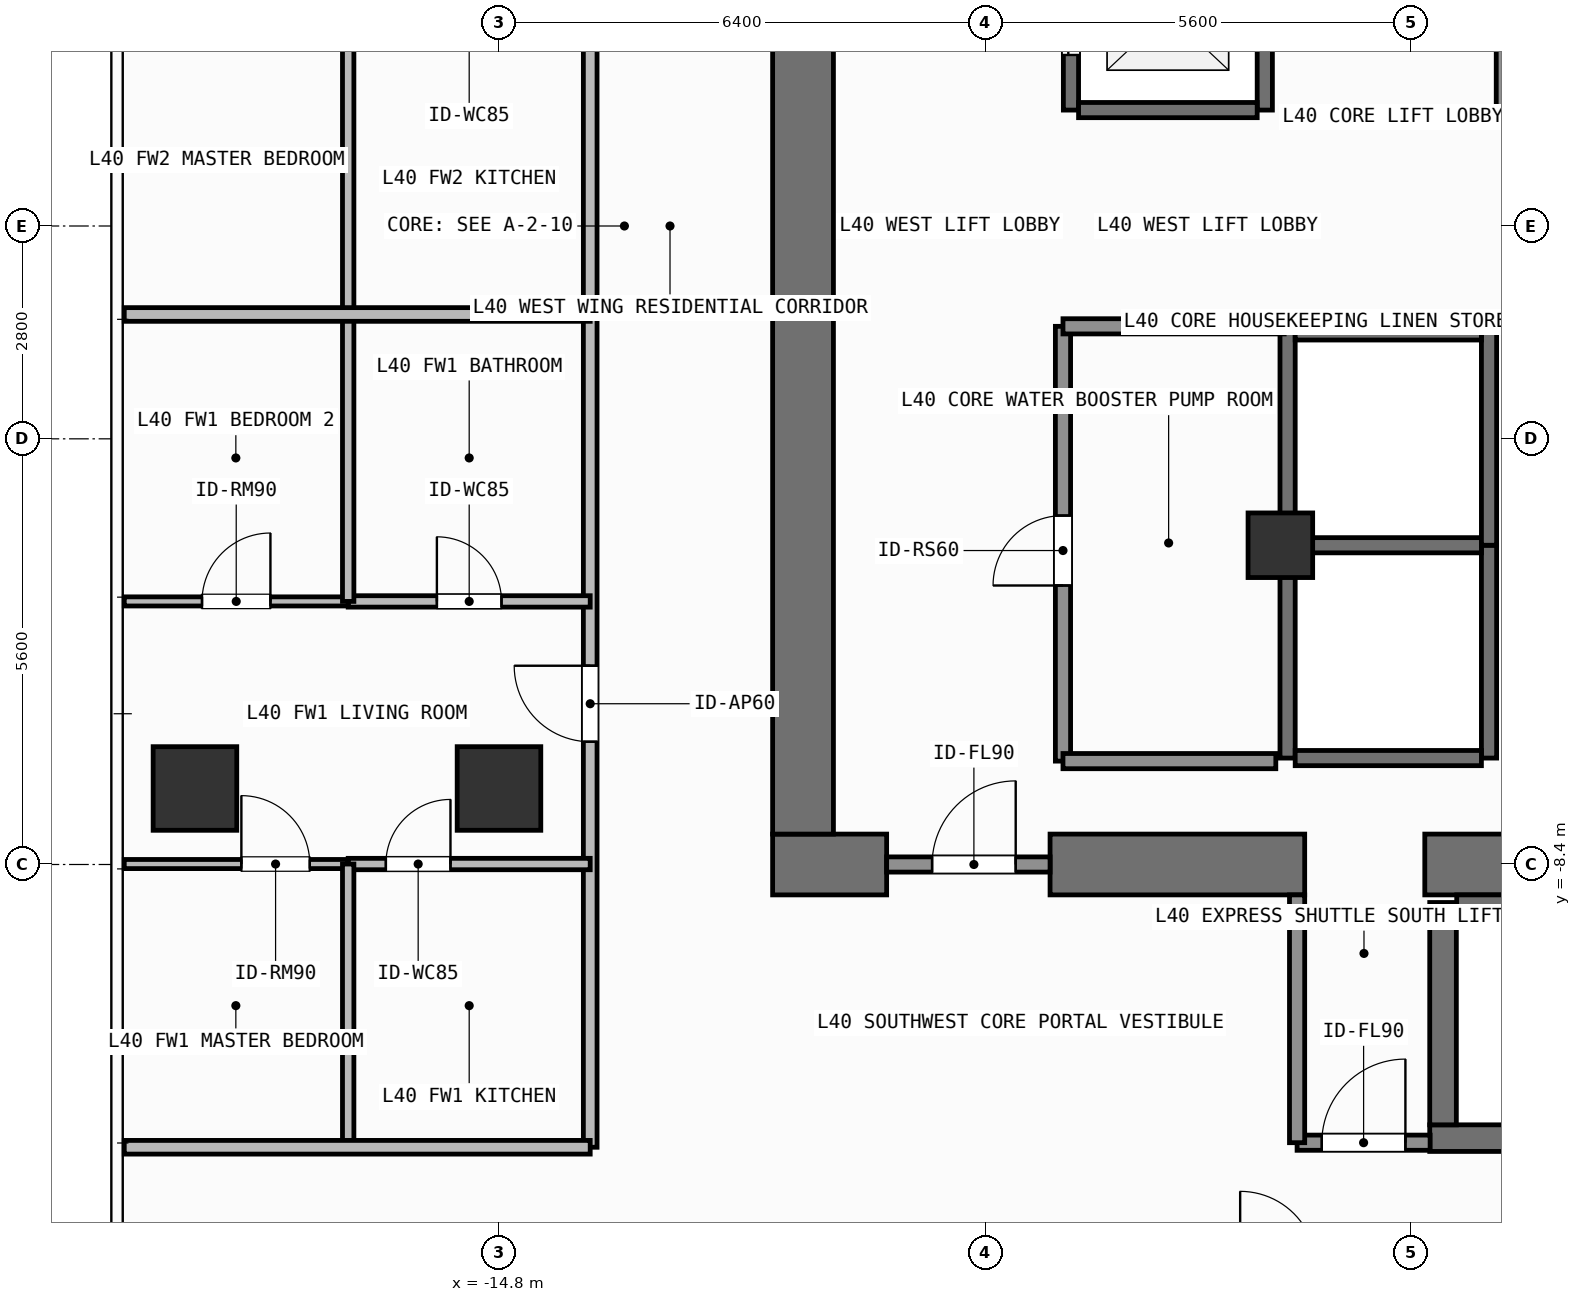
"""IFC4 building model, lengths in metres.
Left out: names, types, materials, properties, quantities, classifications, styles, units other than length and angle.
Written with IfcOpenShell. Run it as: python <this file> out.ifc"""

import sys

from ifc_helpers import new_model, si_unit, direction, frame, frame_2d, origin, origin_2d, place, context, subcontext, project, spatial, rectangle, extrude, element, fill, save


model = new_model("IFC4")
c1 = context("Model", 3, precision=1e-05, world=origin(), true_north=direction((0.0, 1.0)))
c2 = subcontext(c1, "Body", "Model", "MODEL_VIEW")
j1 = project(units=[si_unit("LENGTHUNIT", "METRE"), si_unit("PLANEANGLEUNIT", "RADIAN")], contexts=[c1])
p1 = place(None, origin())
s1 = spatial("IfcSite", under=j1, at=p1, CompositionType="ELEMENT")
p2 = place(p1, origin())
s2 = spatial("IfcBuilding", under=s1, at=p2, CompositionType="ELEMENT")
p3 = place(p2, frame((0.0, 0.0, 164.1)))
s3 = spatial("IfcBuildingStorey", under=s2, at=p3, CompositionType="ELEMENT", Elevation=164.1)
p4 = place(p3, frame((-11.2, -8.4, 0.0), z_axis=(0.0, 0.0, 1.0), x_axis=(1.0, 0.0, 0.0)))
e1 = element("IfcWall", 1, at=p4, inside=s3, PredefinedType="SHEAR", context=c2, shape_type="SweptSolid", body=[
    extrude(rectangle(XDim=1.5, YDim=0.8, at=frame_2d((0.75, 0.0))), origin(), (0.0, 0.0, 1.0), 3.9),
])
p5 = place(p3, frame((-7.55, -8.4, 0.0), z_axis=(0.0, 0.0, 1.0), x_axis=(1.0, 0.0, 0.0)))
e2 = element("IfcWall", 2, at=p5, inside=s3, PredefinedType="SHEAR", context=c2, shape_type="SweptSolid", body=[
    extrude(rectangle(XDim=3.35, YDim=0.8, at=frame_2d((1.675, 0.0))), origin(), (0.0, 0.0, 1.0), 3.9),
])
p6 = place(p3, frame((-2.62, -8.4, 0.0), z_axis=(0.0, 0.0, 1.0), x_axis=(1.0, 0.0, 0.0)))
e3 = element("IfcWall", 3, at=p6, inside=s3, PredefinedType="SHEAR", context=c2, shape_type="SweptSolid", body=[
    extrude(rectangle(XDim=7.27, YDim=0.8, at=frame_2d((3.635, 0.0))), origin(), (0.0, 0.0, 1.0), 3.9),
])
p7 = place(p3, frame((-10.8, -8.0, 0.0), z_axis=(0.0, 0.0, 1.0), x_axis=(0.0, 1.0, 0.0)))
e4 = element("IfcWall", 4, at=p7, inside=s3, PredefinedType="SHEAR", context=c2, shape_type="SweptSolid", body=[
    extrude(rectangle(XDim=16.0, YDim=0.8, at=frame_2d((8.0, 0.0))), origin(), (0.0, 0.0, 1.0), 3.9),
])
p8 = place(p3, frame((-2.555, -12.0, 0.0), z_axis=(0.0, 0.0, 1.0), x_axis=(1.0, 0.0, 0.0)))
e5 = element("IfcWall", 5, at=p8, inside=s3, PredefinedType="SHEAR", context=c2, shape_type="SweptSolid", body=[
    extrude(rectangle(XDim=7.31, YDim=0.35, at=frame_2d((3.655, 0.0))), origin(), (0.0, 0.0, 1.0), 3.9),
])
p9 = place(p3, frame((-2.2, -8.913, 0.0), z_axis=(0.0, 0.0, 1.0), x_axis=(1.0, 0.0, 0.0)))
e6 = element("IfcWall", 6, at=p9, inside=s3, PredefinedType="SHEAR", context=c2, shape_type="SweptSolid", body=[
    extrude(rectangle(XDim=6.6, YDim=0.225, at=frame_2d((3.3, 0.0))), origin(), (0.0, 0.0, 1.0), 3.9),
])
p10 = place(p3, frame((-2.38, -11.825, 0.0), z_axis=(0.0, 0.0, 1.0), x_axis=(0.0, 1.0, 0.0)))
e7 = element("IfcWall", 7, at=p10, inside=s3, PredefinedType="SHEAR", context=c2, shape_type="SweptSolid", body=[
    extrude(rectangle(XDim=2.925, YDim=0.35, at=frame_2d((1.462, 0.0))), origin(), (0.0, 0.0, 1.0), 3.9),
])
p11 = place(p3, frame((-14.8, -7.4, 0.0), z_axis=(0.0, 0.0, 1.0), x_axis=(1.0, 0.0, 0.0)))
e8 = element("IfcColumn", 8, at=p11, inside=s3, PredefinedType="COLUMN", context=c2, shape_type="SweptSolid", body=[
    extrude(rectangle(XDim=1.1, YDim=1.1, at=origin_2d()), origin(), (0.0, 0.0, 1.0), 3.9),
])
p12 = place(p3, frame((-4.52, -4.2, 0.0), z_axis=(0.0, 0.0, 1.0), x_axis=(1.0, 0.0, 0.0)))
e9 = element("IfcColumn", 9, at=p12, inside=s3, PredefinedType="COLUMN", context=c2, shape_type="SweptSolid", body=[
    extrude(rectangle(XDim=0.85, YDim=0.85, at=origin_2d()), origin(), (0.0, 0.0, 1.0), 3.9),
])
p13 = place(p3, frame((-18.8, -7.4, 0.0), z_axis=(0.0, 0.0, 1.0), x_axis=(1.0, 0.0, 0.0)))
e10 = element("IfcColumn", 10, at=p13, inside=s3, PredefinedType="COLUMN", context=c2, shape_type="SweptSolid", body=[
    extrude(rectangle(XDim=1.1, YDim=1.1, at=origin_2d()), origin(), (0.0, 0.0, 1.0), 3.9),
])
p14 = place(p3, frame((-7.275, 1.525, 0.0), z_axis=(0.0, 0.0, 1.0), x_axis=(0.0, 1.0, 0.0)))
e11 = element("IfcWall", 11, at=p14, inside=s3, PredefinedType="SHEAR", context=c2, shape_type="SweptSolid", body=[
    extrude(rectangle(XDim=2.55, YDim=0.2, at=frame_2d((1.275, 0.0))), origin(), (0.0, 0.0, 1.0), 3.62),
])
p15 = place(p14, frame((0.725, 0.0, 0.0)))
e12 = element("IfcOpeningElement", 12, at=p15, cuts=e11, PredefinedType="OPENING", context=c2, shape_type="SweptSolid", body=[
    extrude(rectangle(XDim=1.1, YDim=2.2, at=frame_2d((0.55, 1.1))), frame((0.0, 0.11, 0.0), z_axis=(0.0, -1.0, 0.0), x_axis=(1.0, 0.0, 0.0)), (0.0, 0.0, 1.0), 0.22),
])
p16 = place(p3, frame((-4.725, 1.525, 0.0), z_axis=(0.0, 0.0, 1.0), x_axis=(0.0, 1.0, 0.0)))
e13 = element("IfcWall", 13, at=p16, inside=s3, PredefinedType="SHEAR", context=c2, shape_type="SweptSolid", body=[
    extrude(rectangle(XDim=2.55, YDim=0.2, at=frame_2d((1.275, 0.0))), origin(), (0.0, 0.0, 1.0), 3.62),
])
p17 = place(p3, frame((-7.175, 1.525, 0.0), z_axis=(0.0, 0.0, 1.0), x_axis=(1.0, 0.0, 0.0)))
e14 = element("IfcWall", 14, at=p17, inside=s3, PredefinedType="SHEAR", context=c2, shape_type="SweptSolid", body=[
    extrude(rectangle(XDim=2.35, YDim=0.2, at=frame_2d((1.175, 0.0))), origin(), (0.0, 0.0, 1.0), 3.62),
])
for number, where, z_axis, x_axis in (
    (15, (-4.425, -7.0, 0.0), (0.0, 0.0, 1.0), (0.0, 1.0, 0.0)),
    (16, (-1.775, -7.0, 0.0), (0.0, 0.0, 1.0), (0.0, 1.0, 0.0)),
):
    element("IfcWall", number, at=place(p3, frame(where, z_axis=z_axis, x_axis=x_axis)), inside=s3, PredefinedType="SHEAR", context=c2, shape_type="SweptSolid", body=[
        extrude(rectangle(XDim=2.8, YDim=0.2, at=frame_2d((1.4, 0.0))), origin(), (0.0, 0.0, 1.0), 3.62),
    ])
for number, where, z_axis, x_axis in (
    (17, (-4.325, -7.0, 0.0), (0.0, 0.0, 1.0), (1.0, 0.0, 0.0)),
    (18, (-4.325, -4.2, 0.0), (0.0, 0.0, 1.0), (1.0, 0.0, 0.0)),
):
    element("IfcWall", number, at=place(p3, frame(where, z_axis=z_axis, x_axis=x_axis)), inside=s3, PredefinedType="SHEAR", context=c2, shape_type="SweptSolid", body=[
        extrude(rectangle(XDim=2.45, YDim=0.2, at=frame_2d((1.225, 0.0))), origin(), (0.0, 0.0, 1.0), 3.62),
    ])
for number, where, z_axis, x_axis in (
    (19, (-4.425, -4.2, 0.0), (0.0, 0.0, 1.0), (0.0, 1.0, 0.0)),
    (20, (-1.775, -4.2, 0.0), (0.0, 0.0, 1.0), (0.0, 1.0, 0.0)),
):
    element("IfcWall", number, at=place(p3, frame(where, z_axis=z_axis, x_axis=x_axis)), inside=s3, PredefinedType="SHEAR", context=c2, shape_type="SweptSolid", body=[
        extrude(rectangle(XDim=2.8, YDim=0.2, at=frame_2d((1.4, 0.0))), origin(), (0.0, 0.0, 1.0), 3.62),
    ])
p18 = place(p3, frame((-4.325, -1.4, 0.0), z_axis=(0.0, 0.0, 1.0), x_axis=(1.0, 0.0, 0.0)))
e21 = element("IfcWall", 21, at=p18, inside=s3, PredefinedType="SHEAR", context=c2, shape_type="SweptSolid", body=[
    extrude(rectangle(XDim=2.45, YDim=0.2, at=frame_2d((1.225, 0.0))), origin(), (0.0, 0.0, 1.0), 3.62),
])
p19 = place(p3, frame((-9.7, -8.4, 0.0), z_axis=(0.0, 0.0, 1.0), x_axis=(1.0, 0.0, 0.0)))
e22 = element("IfcWall", 22, at=p19, inside=s3, PredefinedType="SOLIDWALL", context=c2, shape_type="SweptSolid", body=[
    extrude(rectangle(XDim=2.15, YDim=0.2, at=frame_2d((1.075, 0.0))), origin(), (0.0, 0.0, 1.0), 2.76),
])
p20 = place(p19, frame((0.598, 0.0, 0.0)))
e23 = element("IfcOpeningElement", 23, at=p20, cuts=e22, PredefinedType="OPENING", context=c2, shape_type="SweptSolid", body=[
    extrude(rectangle(XDim=1.1, YDim=2.15, at=frame_2d((0.55, 1.075))), frame((0.0, 0.11, 0.0), z_axis=(0.0, -1.0, 0.0), x_axis=(1.0, 0.0, 0.0)), (0.0, 0.0, 1.0), 0.22),
])
p21 = place(p3, frame((-4.3, -12.06, 0.0), z_axis=(0.0, 0.0, 1.0), x_axis=(1.0, 0.0, 0.0)))
e24 = element("IfcWall", 24, at=p21, inside=s3, PredefinedType="SOLIDWALL", context=c2, shape_type="SweptSolid", body=[
    extrude(rectangle(XDim=1.75, YDim=0.2, at=frame_2d((0.875, 0.0))), origin(), (0.0, 0.0, 1.0), 3.62),
])
p22 = place(p21, frame((0.325, 0.0, 0.0)))
e25 = element("IfcOpeningElement", 25, at=p22, cuts=e24, PredefinedType="OPENING", context=c2, shape_type="SweptSolid", body=[
    extrude(rectangle(XDim=1.1, YDim=2.15, at=frame_2d((0.55, 1.075))), frame((0.0, 0.11, 0.0), z_axis=(0.0, -1.0, 0.0), x_axis=(1.0, 0.0, 0.0)), (0.0, 0.0, 1.0), 0.22),
])
p23 = place(p3, frame((-7.38, -7.04, 0.0), z_axis=(0.0, 0.0, 1.0), x_axis=(0.0, 1.0, 0.0)))
e26 = element("IfcWall", 26, at=p23, inside=s3, PredefinedType="SOLIDWALL", context=c2, shape_type="SweptSolid", body=[
    extrude(rectangle(XDim=5.72, YDim=0.2, at=frame_2d((2.86, 0.0))), origin(), (0.0, 0.0, 1.0), 3.62),
])
p24 = place(p23, frame((2.31, 0.0, 0.0)))
e27 = element("IfcOpeningElement", 27, at=p24, cuts=e26, PredefinedType="OPENING", context=c2, shape_type="SweptSolid", body=[
    extrude(rectangle(XDim=0.92, YDim=2.1, at=frame_2d((0.46, 1.05))), frame((0.0, 0.11, 0.0), z_axis=(0.0, -1.0, 0.0), x_axis=(1.0, 0.0, 0.0)), (0.0, 0.0, 1.0), 0.22),
])
p25 = place(p3, frame((-13.6, -12.12, 0.0), z_axis=(0.0, 0.0, 1.0), x_axis=(0.0, 1.0, 0.0)))
e28 = element("IfcWall", 28, at=p25, inside=s3, PredefinedType="PARTITIONING", context=c2, shape_type="SweptSolid", body=[
    extrude(rectangle(XDim=10.956, YDim=0.18, at=frame_2d((5.478, 0.0))), origin(), (0.0, 0.0, 1.0), 3.62),
])
p26 = place(p25, frame((5.335, 0.0, 0.0)))
e29 = element("IfcOpeningElement", 29, at=p26, cuts=e28, PredefinedType="OPENING", context=c2, shape_type="SweptSolid", body=[
    extrude(rectangle(XDim=1.0, YDim=2.2, at=frame_2d((0.5, 1.1))), frame((0.0, 0.1, 0.0), z_axis=(0.0, -1.0, 0.0), x_axis=(1.0, 0.0, 0.0)), (0.0, 0.0, 1.0), 0.2),
])
p27 = place(p3, frame((-16.784, -4.939, 0.0), z_axis=(0.0, 0.0, 1.0), x_axis=(1.0, 0.0, 0.0)))
e30 = element("IfcWall", 30, at=p27, inside=s3, PredefinedType="PARTITIONING", context=c2, shape_type="SweptSolid", body=[
    extrude(rectangle(XDim=3.184, YDim=0.15, at=frame_2d((1.592, 0.0))), origin(), (0.0, 0.0, 1.0), 3.62),
])
p28 = place(p27, frame((1.167, 0.0, 0.0)))
e31 = element("IfcOpeningElement", 31, at=p28, cuts=e30, PredefinedType="OPENING", context=c2, shape_type="SweptSolid", body=[
    extrude(rectangle(XDim=0.85, YDim=2.1, at=frame_2d((0.425, 1.05))), frame((0.0, 0.085, 0.0), z_axis=(0.0, -1.0, 0.0), x_axis=(1.0, 0.0, 0.0)), (0.0, 0.0, 1.0), 0.17),
])
p29 = place(p3, frame((-16.784, -8.394, 0.0), z_axis=(0.0, 0.0, 1.0), x_axis=(1.0, 0.0, 0.0)))
e32 = element("IfcWall", 32, at=p29, inside=s3, PredefinedType="PARTITIONING", context=c2, shape_type="SweptSolid", body=[
    extrude(rectangle(XDim=3.184, YDim=0.15, at=frame_2d((1.592, 0.0))), origin(), (0.0, 0.0, 1.0), 3.62),
])
p30 = place(p29, frame((0.496, 0.0, 0.0)))
e33 = element("IfcOpeningElement", 33, at=p30, cuts=e32, PredefinedType="OPENING", context=c2, shape_type="SweptSolid", body=[
    extrude(rectangle(XDim=0.85, YDim=2.1, at=frame_2d((0.425, 1.05))), frame((0.0, 0.085, 0.0), z_axis=(0.0, -1.0, 0.0), x_axis=(1.0, 0.0, 0.0)), (0.0, 0.0, 1.0), 0.17),
])
p31 = place(p3, frame((-19.73, -8.394, 0.0), z_axis=(0.0, 0.0, 1.0), x_axis=(1.0, 0.0, 0.0)))
e34 = element("IfcWall", 34, at=p31, inside=s3, PredefinedType="PARTITIONING", context=c2, shape_type="SweptSolid", body=[
    extrude(rectangle(XDim=2.946, YDim=0.12, at=frame_2d((1.473, 0.0))), origin(), (0.0, 0.0, 1.0), 3.62),
])
p32 = place(p31, frame((1.541, 0.0, 0.0)))
e35 = element("IfcOpeningElement", 35, at=p32, cuts=e34, PredefinedType="OPENING", context=c2, shape_type="SweptSolid", body=[
    extrude(rectangle(XDim=0.9, YDim=2.1, at=frame_2d((0.45, 1.05))), frame((0.0, 0.07, 0.0), z_axis=(0.0, -1.0, 0.0), x_axis=(1.0, 0.0, 0.0)), (0.0, 0.0, 1.0), 0.14),
])
p33 = place(p3, frame((-19.73, -4.939, 0.0), z_axis=(0.0, 0.0, 1.0), x_axis=(1.0, 0.0, 0.0)))
e36 = element("IfcWall", 36, at=p33, inside=s3, PredefinedType="PARTITIONING", context=c2, shape_type="SweptSolid", body=[
    extrude(rectangle(XDim=2.946, YDim=0.12, at=frame_2d((1.473, 0.0))), origin(), (0.0, 0.0, 1.0), 3.62),
])
p34 = place(p33, frame((1.023, 0.0, 0.0)))
e37 = element("IfcOpeningElement", 37, at=p34, cuts=e36, PredefinedType="OPENING", context=c2, shape_type="SweptSolid", body=[
    extrude(rectangle(XDim=0.9, YDim=2.1, at=frame_2d((0.45, 1.05))), frame((0.0, 0.07, 0.0), z_axis=(0.0, -1.0, 0.0), x_axis=(1.0, 0.0, 0.0)), (0.0, 0.0, 1.0), 0.14),
])
p35 = place(p3, frame((-13.6, -1.164, 0.0), z_axis=(0.0, 0.0, 1.0), x_axis=(0.0, 1.0, 0.0)))
e38 = element("IfcWall", 38, at=p35, inside=s3, PredefinedType="PARTITIONING", context=c2, shape_type="SweptSolid", body=[
    extrude(rectangle(XDim=13.284, YDim=0.18, at=frame_2d((6.642, 0.0))), origin(), (0.0, 0.0, 1.0), 3.62),
])
p36 = place(p35, frame((6.231, 0.0, 0.0)))
e39 = element("IfcOpeningElement", 39, at=p36, cuts=e38, PredefinedType="OPENING", context=c2, shape_type="SweptSolid", body=[
    extrude(rectangle(XDim=1.0, YDim=2.2, at=frame_2d((0.5, 1.1))), frame((0.0, 0.1, 0.0), z_axis=(0.0, -1.0, 0.0), x_axis=(1.0, 0.0, 0.0)), (0.0, 0.0, 1.0), 0.2),
])
p37 = place(p3, frame((-4.3, -12.06, 0.0), z_axis=(0.0, 0.0, 1.0), x_axis=(0.0, 1.0, 0.0)))
e40 = element("IfcWall", 40, at=p37, inside=s3, PredefinedType="SOLIDWALL", context=c2, shape_type="SweptSolid", body=[
    extrude(rectangle(XDim=3.26, YDim=0.2, at=frame_2d((1.63, 0.0))), origin(), (0.0, 0.0, 1.0), 3.62),
])
p38 = place(p3, frame((-7.38, -1.32, 0.0), z_axis=(0.0, 0.0, 1.0), x_axis=(1.0, 0.0, 0.0)))
e41 = element("IfcWall", 41, at=p38, inside=s3, PredefinedType="SOLIDWALL", context=c2, shape_type="SweptSolid", body=[
    extrude(rectangle(XDim=2.91, YDim=0.2, at=frame_2d((1.455, 0.0))), origin(), (0.0, 0.0, 1.0), 3.62),
])
p39 = place(p3, frame((-1.58, 1.48, 0.0), z_axis=(0.0, 0.0, 1.0), x_axis=(0.0, 1.0, 0.0)))
e42 = element("IfcWall", 42, at=p39, inside=s3, PredefinedType="SOLIDWALL", context=c2, shape_type="SweptSolid", body=[
    extrude(rectangle(XDim=2.7, YDim=0.2, at=frame_2d((1.35, 0.0))), origin(), (0.0, 0.0, 1.0), 3.62),
])
p40 = place(p3, frame((-7.38, -7.04, 0.0), z_axis=(0.0, 0.0, 1.0), x_axis=(1.0, 0.0, 0.0)))
e43 = element("IfcWall", 43, at=p40, inside=s3, PredefinedType="SOLIDWALL", context=c2, shape_type="SweptSolid", body=[
    extrude(rectangle(XDim=2.8, YDim=0.2, at=frame_2d((1.4, 0.0))), origin(), (0.0, 0.0, 1.0), 3.62),
])
p41 = place(p3, frame((-16.784, -12.12, 0.0), z_axis=(0.0, 0.0, 1.0), x_axis=(0.0, 1.0, 0.0)))
e44 = element("IfcWall", 44, at=p41, inside=s3, PredefinedType="PARTITIONING", context=c2, shape_type="SweptSolid", body=[
    extrude(rectangle(XDim=3.726, YDim=0.15, at=frame_2d((1.863, 0.0))), origin(), (0.0, 0.0, 1.0), 3.62),
])
p42 = place(p3, frame((-16.784, -4.939, 0.0), z_axis=(0.0, 0.0, 1.0), x_axis=(0.0, 1.0, 0.0)))
e45 = element("IfcWall", 45, at=p42, inside=s3, PredefinedType="PARTITIONING", context=c2, shape_type="SweptSolid", body=[
    extrude(rectangle(XDim=3.775, YDim=0.15, at=frame_2d((1.887, 0.0))), origin(), (0.0, 0.0, 1.0), 3.62),
])
p43 = place(p3, frame((-16.784, -1.164, 0.0), z_axis=(0.0, 0.0, 1.0), x_axis=(0.0, 1.0, 0.0)))
e46 = element("IfcWall", 46, at=p43, inside=s3, PredefinedType="PARTITIONING", context=c2, shape_type="SweptSolid", body=[
    extrude(rectangle(XDim=4.058, YDim=0.15, at=frame_2d((2.029, 0.0))), origin(), (0.0, 0.0, 1.0), 3.62),
])
for number, where, z_axis, x_axis in (
    (47, (-19.73, -1.164, 0.0), (0.0, 0.0, 1.0), (1.0, 0.0, 0.0)),
    (48, (-19.73, -12.12, 0.0), (0.0, 0.0, 1.0), (1.0, 0.0, 0.0)),
):
    element("IfcWall", number, at=place(p3, frame(where, z_axis=z_axis, x_axis=x_axis)), inside=s3, PredefinedType="PARTITIONING", context=c2, shape_type="SweptSolid", body=[
        extrude(rectangle(XDim=6.13, YDim=0.18, at=frame_2d((3.065, 0.0))), origin(), (0.0, 0.0, 1.0), 3.62),
    ])
p44 = place(p15, origin())
e49 = element("IfcDoor", 49, at=p44, inside=s3, OperationType="SLIDING_TO_LEFT", PredefinedType="DOOR", context=c2, shape_type="SweptSolid", body=[
    extrude(rectangle(XDim=1.1, YDim=2.2, at=frame_2d((0.55, 1.1))), frame((0.0, 0.025, 0.0), z_axis=(0.0, -1.0, 0.0), x_axis=(1.0, 0.0, 0.0)), (0.0, 0.0, 1.0), 0.05),
])
fill(e12, e49)
p45 = place(p20, origin())
e50 = element("IfcDoor", 50, at=p45, inside=s3, OperationType="SINGLE_SWING_RIGHT", PredefinedType="DOOR", context=c2, shape_type="SweptSolid", body=[
    extrude(rectangle(XDim=1.1, YDim=2.15, at=frame_2d((0.55, 1.075))), frame((0.0, 0.025, 0.0), z_axis=(0.0, -1.0, 0.0), x_axis=(1.0, 0.0, 0.0)), (0.0, 0.0, 1.0), 0.05),
])
fill(e23, e50)
p46 = place(p22, origin())
e51 = element("IfcDoor", 51, at=p46, inside=s3, OperationType="SINGLE_SWING_RIGHT", PredefinedType="DOOR", context=c2, shape_type="SweptSolid", body=[
    extrude(rectangle(XDim=1.1, YDim=2.15, at=frame_2d((0.55, 1.075))), frame((0.0, 0.025, 0.0), z_axis=(0.0, -1.0, 0.0), x_axis=(1.0, 0.0, 0.0)), (0.0, 0.0, 1.0), 0.05),
])
fill(e25, e51)
p47 = place(p24, origin())
e52 = element("IfcDoor", 52, at=p47, inside=s3, OperationType="SINGLE_SWING_LEFT", PredefinedType="DOOR", context=c2, shape_type="SweptSolid", body=[
    extrude(rectangle(XDim=0.92, YDim=2.1, at=frame_2d((0.46, 1.05))), frame((0.0, 0.025, 0.0), z_axis=(0.0, -1.0, 0.0), x_axis=(1.0, 0.0, 0.0)), (0.0, 0.0, 1.0), 0.05),
])
fill(e27, e52)
p48 = place(p26, origin())
e53 = element("IfcDoor", 53, at=p48, inside=s3, OperationType="SINGLE_SWING_RIGHT", PredefinedType="DOOR", context=c2, shape_type="SweptSolid", body=[
    extrude(rectangle(XDim=1.0, YDim=2.2, at=frame_2d((0.5, 1.1))), frame((0.0, 0.025, 0.0), z_axis=(0.0, -1.0, 0.0), x_axis=(1.0, 0.0, 0.0)), (0.0, 0.0, 1.0), 0.05),
])
fill(e29, e53)
p49 = place(p28, origin())
e54 = element("IfcDoor", 54, at=p49, inside=s3, OperationType="SINGLE_SWING_LEFT", PredefinedType="DOOR", context=c2, shape_type="SweptSolid", body=[
    extrude(rectangle(XDim=0.85, YDim=2.1, at=frame_2d((0.425, 1.05))), frame((0.0, 0.025, 0.0), z_axis=(0.0, -1.0, 0.0), x_axis=(1.0, 0.0, 0.0)), (0.0, 0.0, 1.0), 0.05),
])
fill(e31, e54)
p50 = place(p30, origin())
e55 = element("IfcDoor", 55, at=p50, inside=s3, OperationType="SINGLE_SWING_RIGHT", PredefinedType="DOOR", context=c2, shape_type="SweptSolid", body=[
    extrude(rectangle(XDim=0.85, YDim=2.1, at=frame_2d((0.425, 1.05))), frame((0.0, 0.025, 0.0), z_axis=(0.0, -1.0, 0.0), x_axis=(1.0, 0.0, 0.0)), (0.0, 0.0, 1.0), 0.05),
])
fill(e33, e55)
p51 = place(p32, origin())
e56 = element("IfcDoor", 56, at=p51, inside=s3, OperationType="SINGLE_SWING_LEFT", PredefinedType="DOOR", context=c2, shape_type="SweptSolid", body=[
    extrude(rectangle(XDim=0.9, YDim=2.1, at=frame_2d((0.45, 1.05))), frame((0.0, 0.025, 0.0), z_axis=(0.0, -1.0, 0.0), x_axis=(1.0, 0.0, 0.0)), (0.0, 0.0, 1.0), 0.05),
])
fill(e35, e56)
p52 = place(p34, origin())
e57 = element("IfcDoor", 57, at=p52, inside=s3, OperationType="SINGLE_SWING_RIGHT", PredefinedType="DOOR", context=c2, shape_type="SweptSolid", body=[
    extrude(rectangle(XDim=0.9, YDim=2.1, at=frame_2d((0.45, 1.05))), frame((0.0, 0.025, 0.0), z_axis=(0.0, -1.0, 0.0), x_axis=(1.0, 0.0, 0.0)), (0.0, 0.0, 1.0), 0.05),
])
fill(e37, e57)
save(model, sys.argv[1])
